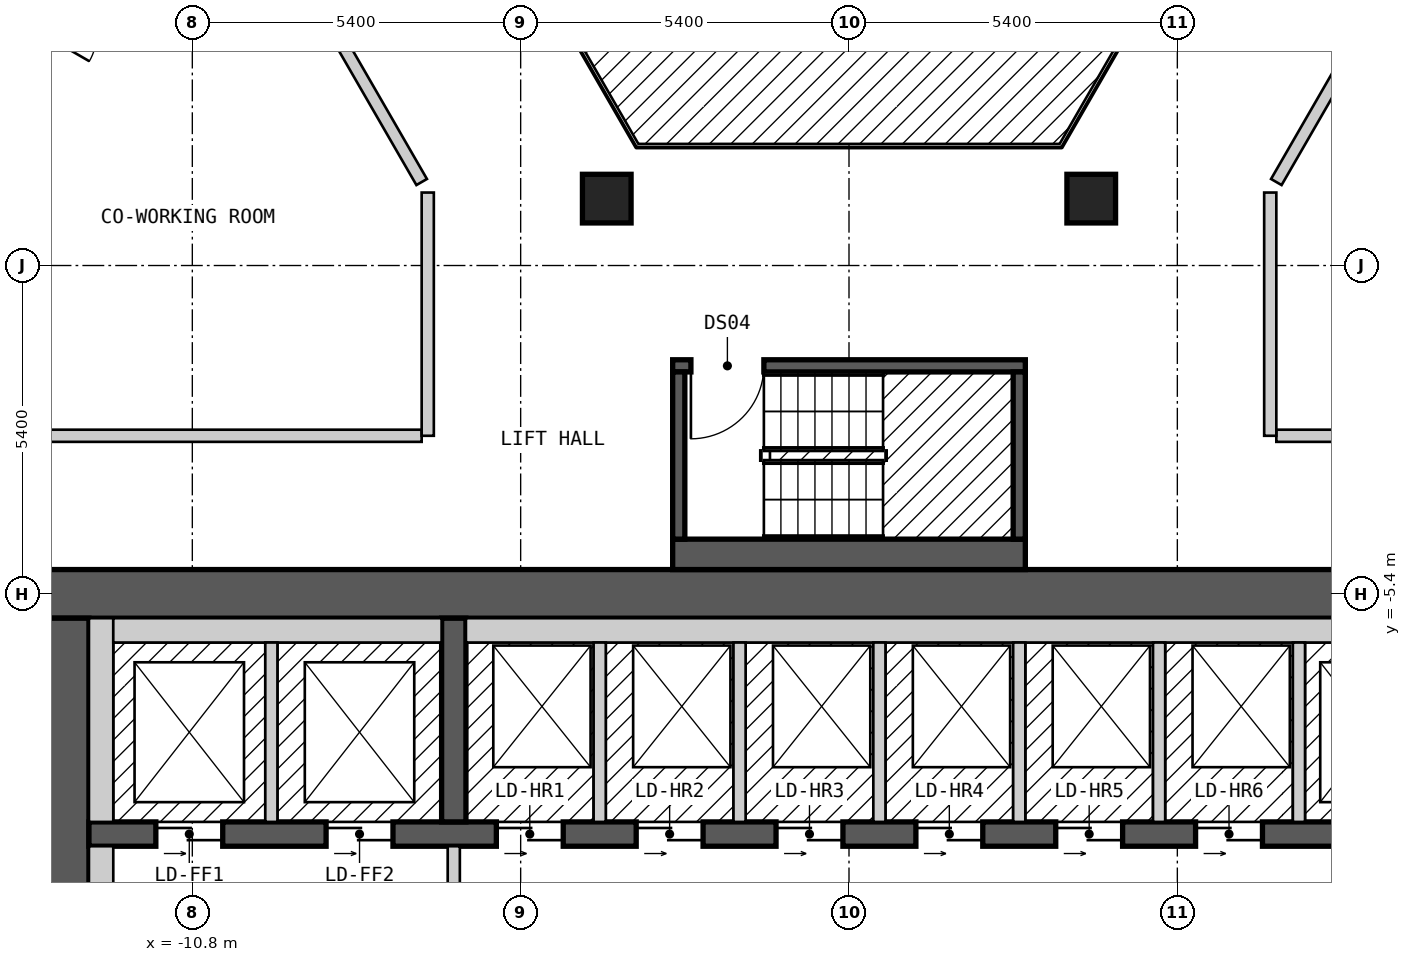
"""IFC4 building model, lengths in metres.
Left out: names, types, materials, properties, quantities, classifications, styles, units other than length and angle.
Written with IfcOpenShell. Run it as: python <this file> out.ifc"""

import sys

from ifc_helpers import new_model, si_unit, direction, frame, frame_2d, origin, origin_2d, place, context, subcontext, project, spatial, rectangle, extrude, element, fill, save


model = new_model("IFC4")
c1 = context("Model", 3, precision=1e-05, world=origin(), true_north=direction((0.0, 1.0)))
c2 = subcontext(c1, "Body", "Model", "MODEL_VIEW")
j1 = project(units=[si_unit("LENGTHUNIT", "METRE"), si_unit("PLANEANGLEUNIT", "RADIAN")], contexts=[c1])
p1 = place(None, origin())
s1 = spatial("IfcSite", under=j1, at=p1, CompositionType="ELEMENT")
p2 = place(p1, origin())
s2 = spatial("IfcBuilding", under=s1, at=p2, CompositionType="ELEMENT")
p3 = place(p2, frame((0.0, 0.0, 126.6)))
s3 = spatial("IfcBuildingStorey", under=s2, at=p3, CompositionType="ELEMENT", Elevation=126.6)
for number, where, z_axis, x_axis in (
    (1, (3.984, 1.1, 0.0), (0.0, 0.0, 1.0), (1.0, 0.0, 0.0)),
    (2, (-3.984, 1.1, 0.0), (0.0, 0.0, 1.0), (1.0, 0.0, 0.0)),
):
    element("IfcColumn", number, at=place(p3, frame(where, z_axis=z_axis, x_axis=x_axis)), inside=s3, PredefinedType="COLUMN", context=c2, shape_type="SweptSolid", body=[
        extrude(rectangle(XDim=0.8, YDim=0.8, at=origin_2d()), origin(), (0.0, 0.0, 1.0), 3.0),
    ])
p4 = place(p3, frame((-13.3, -5.4, 0.0), z_axis=(0.0, 0.0, 1.0), x_axis=(1.0, 0.0, 0.0)))
e3 = element("IfcWall", 3, at=p4, inside=s3, PredefinedType="SHEAR", context=c2, shape_type="SweptSolid", body=[
    extrude(rectangle(XDim=26.6, YDim=0.8, at=frame_2d((13.3, 0.0))), origin(), (0.0, 0.0, 1.0), 2.7),
])
p5 = place(p4, frame((23.65, 0.0, 0.0)))
e4 = element("IfcOpeningElement", 4, at=p5, cuts=e3, PredefinedType="OPENING", context=c2, shape_type="SweptSolid", body=[
    extrude(rectangle(XDim=1.2, YDim=2.1, at=frame_2d((0.6, 1.05))), frame((0.0, 0.41, 0.0), z_axis=(0.0, -1.0, 0.0), x_axis=(1.0, 0.0, 0.0)), (0.0, 0.0, 1.0), 0.82),
])
p6 = place(p3, frame((-12.9, -18.2, 0.0), z_axis=(0.0, 0.0, 1.0), x_axis=(0.0, 1.0, 0.0)))
e5 = element("IfcWall", 5, at=p6, inside=s3, PredefinedType="SHEAR", context=c2, shape_type="SweptSolid", body=[
    extrude(rectangle(XDim=12.4, YDim=0.8, at=frame_2d((6.2, 0.0))), origin(), (0.0, 0.0, 1.0), 2.7),
])
p7 = place(p6, frame((4.0, 0.0, 0.0)))
e6 = element("IfcOpeningElement", 6, at=p7, cuts=e5, PredefinedType="OPENING", context=c2, shape_type="SweptSolid", body=[
    extrude(rectangle(XDim=1.2, YDim=2.1, at=frame_2d((0.6, 1.05))), frame((0.0, 0.41, 0.0), z_axis=(0.0, -1.0, 0.0), x_axis=(1.0, 0.0, 0.0)), (0.0, 0.0, 1.0), 0.82),
])
p8 = place(p3, frame((-12.5, -9.35, 0.0), z_axis=(0.0, 0.0, 1.0), x_axis=(1.0, 0.0, 0.0)))
e7 = element("IfcWall", 7, at=p8, inside=s3, PredefinedType="SHEAR", context=c2, shape_type="SweptSolid", body=[
    extrude(rectangle(XDim=22.7, YDim=0.4, at=frame_2d((11.35, 0.0))), origin(), (0.0, 0.0, 1.0), 2.7),
])
p9 = place(p8, frame((1.1, 0.0, 0.0)))
e8 = element("IfcOpeningElement", 8, at=p9, cuts=e7, PredefinedType="OPENING", context=c2, shape_type="SweptSolid", body=[
    extrude(rectangle(XDim=1.1, YDim=2.1, at=frame_2d((0.55, 1.05))), frame((0.0, 0.21, 0.0), z_axis=(0.0, -1.0, 0.0), x_axis=(1.0, 0.0, 0.0)), (0.0, 0.0, 1.0), 0.42),
])
p10 = place(p8, frame((3.9, 0.0, 0.0)))
e9 = element("IfcOpeningElement", 9, at=p10, cuts=e7, PredefinedType="OPENING", context=c2, shape_type="SweptSolid", body=[
    extrude(rectangle(XDim=1.1, YDim=2.1, at=frame_2d((0.55, 1.05))), frame((0.0, 0.21, 0.0), z_axis=(0.0, -1.0, 0.0), x_axis=(1.0, 0.0, 0.0)), (0.0, 0.0, 1.0), 0.42),
])
p11 = place(p8, frame((6.7, 0.0, 0.0)))
e10 = element("IfcOpeningElement", 10, at=p11, cuts=e7, PredefinedType="OPENING", context=c2, shape_type="SweptSolid", body=[
    extrude(rectangle(XDim=1.1, YDim=2.1, at=frame_2d((0.55, 1.05))), frame((0.0, 0.21, 0.0), z_axis=(0.0, -1.0, 0.0), x_axis=(1.0, 0.0, 0.0)), (0.0, 0.0, 1.0), 0.42),
])
p12 = place(p8, frame((9.0, 0.0, 0.0)))
e11 = element("IfcOpeningElement", 11, at=p12, cuts=e7, PredefinedType="OPENING", context=c2, shape_type="SweptSolid", body=[
    extrude(rectangle(XDim=1.1, YDim=2.1, at=frame_2d((0.55, 1.05))), frame((0.0, 0.21, 0.0), z_axis=(0.0, -1.0, 0.0), x_axis=(1.0, 0.0, 0.0)), (0.0, 0.0, 1.0), 0.42),
])
p13 = place(p8, frame((11.3, 0.0, 0.0)))
e12 = element("IfcOpeningElement", 12, at=p13, cuts=e7, PredefinedType="OPENING", context=c2, shape_type="SweptSolid", body=[
    extrude(rectangle(XDim=1.1, YDim=2.1, at=frame_2d((0.55, 1.05))), frame((0.0, 0.21, 0.0), z_axis=(0.0, -1.0, 0.0), x_axis=(1.0, 0.0, 0.0)), (0.0, 0.0, 1.0), 0.42),
])
p14 = place(p8, frame((13.6, 0.0, 0.0)))
e13 = element("IfcOpeningElement", 13, at=p14, cuts=e7, PredefinedType="OPENING", context=c2, shape_type="SweptSolid", body=[
    extrude(rectangle(XDim=1.1, YDim=2.1, at=frame_2d((0.55, 1.05))), frame((0.0, 0.21, 0.0), z_axis=(0.0, -1.0, 0.0), x_axis=(1.0, 0.0, 0.0)), (0.0, 0.0, 1.0), 0.42),
])
p15 = place(p8, frame((15.9, 0.0, 0.0)))
e14 = element("IfcOpeningElement", 14, at=p15, cuts=e7, PredefinedType="OPENING", context=c2, shape_type="SweptSolid", body=[
    extrude(rectangle(XDim=1.1, YDim=2.1, at=frame_2d((0.55, 1.05))), frame((0.0, 0.21, 0.0), z_axis=(0.0, -1.0, 0.0), x_axis=(1.0, 0.0, 0.0)), (0.0, 0.0, 1.0), 0.42),
])
p16 = place(p8, frame((18.2, 0.0, 0.0)))
e15 = element("IfcOpeningElement", 15, at=p16, cuts=e7, PredefinedType="OPENING", context=c2, shape_type="SweptSolid", body=[
    extrude(rectangle(XDim=1.1, YDim=2.1, at=frame_2d((0.55, 1.05))), frame((0.0, 0.21, 0.0), z_axis=(0.0, -1.0, 0.0), x_axis=(1.0, 0.0, 0.0)), (0.0, 0.0, 1.0), 0.42),
])
p17 = place(p8, frame((20.6, 0.0, 0.0)))
e16 = element("IfcOpeningElement", 16, at=p17, cuts=e7, PredefinedType="OPENING", context=c2, shape_type="SweptSolid", body=[
    extrude(rectangle(XDim=1.1, YDim=2.1, at=frame_2d((0.55, 1.05))), frame((0.0, 0.21, 0.0), z_axis=(0.0, -1.0, 0.0), x_axis=(1.0, 0.0, 0.0)), (0.0, 0.0, 1.0), 0.42),
])
p18 = place(p3, frame((-6.5, -9.15, 0.0), z_axis=(0.0, 0.0, 1.0), x_axis=(0.0, 1.0, 0.0)))
e17 = element("IfcWall", 17, at=p18, inside=s3, PredefinedType="SHEAR", context=c2, shape_type="SweptSolid", body=[
    extrude(rectangle(XDim=3.35, YDim=0.4, at=frame_2d((1.675, 0.0))), origin(), (0.0, 0.0, 1.0), 2.7),
])
p19 = place(p3, frame((-2.9, -4.75, 0.0), z_axis=(0.0, 0.0, 1.0), x_axis=(1.0, 0.0, 0.0)))
e18 = element("IfcWall", 18, at=p19, inside=s3, PredefinedType="SOLIDWALL", context=c2, shape_type="SweptSolid", body=[
    extrude(rectangle(XDim=5.8, YDim=0.5, at=frame_2d((2.9, 0.0))), origin(), (0.0, 0.0, 1.0), 2.7),
])
p20 = place(p3, frame((-2.9, -1.65, 0.0), z_axis=(0.0, 0.0, 1.0), x_axis=(1.0, 0.0, 0.0)))
e19 = element("IfcWall", 19, at=p20, inside=s3, PredefinedType="SOLIDWALL", context=c2, shape_type="SweptSolid", body=[
    extrude(rectangle(XDim=5.8, YDim=0.2, at=frame_2d((2.9, 0.0))), origin(), (0.0, 0.0, 1.0), 2.7),
])
p21 = place(p20, frame((0.3, 0.0, 0.0)))
e20 = element("IfcOpeningElement", 20, at=p21, cuts=e19, PredefinedType="OPENING", context=c2, shape_type="SweptSolid", body=[
    extrude(rectangle(XDim=1.2, YDim=2.1, at=frame_2d((0.6, 1.05))), frame((0.0, 0.11, 0.0), z_axis=(0.0, -1.0, 0.0), x_axis=(1.0, 0.0, 0.0)), (0.0, 0.0, 1.0), 0.22),
])
for number, where, z_axis, x_axis in (
    (21, (-2.8, -4.5, 0.0), (0.0, 0.0, 1.0), (0.0, 1.0, 0.0)),
    (22, (2.8, -4.5, 0.0), (0.0, 0.0, 1.0), (0.0, 1.0, 0.0)),
):
    element("IfcWall", number, at=place(p3, frame(where, z_axis=z_axis, x_axis=x_axis)), inside=s3, PredefinedType="SOLIDWALL", context=c2, shape_type="SweptSolid", body=[
        extrude(rectangle(XDim=2.75, YDim=0.2, at=frame_2d((1.375, 0.0))), origin(), (0.0, 0.0, 1.0), 2.7),
    ])
p22 = place(p3, frame((-10.796, 7.9, 0.0), z_axis=(0.0, 0.0, 1.0), x_axis=(0.499954271211, -0.866051803703, 0.0)))
e23 = element("IfcWall", 23, at=p22, inside=s3, PredefinedType="PARTITIONING", context=c2, shape_type="SweptSolid", body=[
    extrude(rectangle(XDim=7.536, YDim=0.2, at=frame_2d((3.768, 0.0))), origin(), (0.0, 0.0, 1.0), 2.7),
])
p23 = place(p3, frame((7.967, 13.0, 0.0), z_axis=(0.0, 0.0, 1.0), x_axis=(0.50003774998, -0.866003607726, 0.0)))
e24 = element("IfcWall", 24, at=p23, inside=s3, PredefinedType="PARTITIONING", context=c2, shape_type="SweptSolid", body=[
    extrude(rectangle(XDim=14.433, YDim=0.2, at=frame_2d((7.217, 0.0))), origin(), (0.0, 0.0, 1.0), 2.7),
])
p24 = place(p23, frame((6.824, 0.0, 0.0)))
e25 = element("IfcOpeningElement", 25, at=p24, cuts=e24, PredefinedType="OPENING", context=c2, shape_type="SweptSolid", body=[
    extrude(rectangle(XDim=0.9, YDim=2.1, at=frame_2d((0.45, 1.05))), frame((0.0, 0.11, 0.0), z_axis=(0.0, -1.0, 0.0), x_axis=(1.0, 0.0, 0.0)), (0.0, 0.0, 1.0), 0.22),
])
p25 = place(p3, frame((-13.395, -2.8, 0.0), z_axis=(0.0, 0.0, 1.0), x_axis=(1.0, 0.0, 0.0)))
e26 = element("IfcWall", 26, at=p25, inside=s3, PredefinedType="PARTITIONING", context=c2, shape_type="SweptSolid", body=[
    extrude(rectangle(XDim=6.367, YDim=0.2, at=frame_2d((3.184, 0.0))), origin(), (0.0, 0.0, 1.0), 2.7),
])
p26 = place(p3, frame((7.028, -2.8, 0.0), z_axis=(0.0, 0.0, 1.0), x_axis=(1.0, 0.0, 0.0)))
e27 = element("IfcWall", 27, at=p26, inside=s3, PredefinedType="PARTITIONING", context=c2, shape_type="SweptSolid", body=[
    extrude(rectangle(XDim=6.25, YDim=0.2, at=frame_2d((3.125, 0.0))), origin(), (0.0, 0.0, 1.0), 2.7),
])
p27 = place(p3, frame((7.028, 1.373, 0.0), z_axis=(0.0, 0.0, 1.0), x_axis=(0.499954271211, 0.866051803703, 0.0)))
e28 = element("IfcWall", 28, at=p27, inside=s3, PredefinedType="PARTITIONING", context=c2, shape_type="SweptSolid", body=[
    extrude(rectangle(XDim=7.536, YDim=0.2, at=frame_2d((3.768, 0.0))), origin(), (0.0, 0.0, 1.0), 2.7),
])
p28 = place(p3, frame((-15.242, 0.399, 0.0), z_axis=(0.0, 0.0, 1.0), x_axis=(0.499953615651, 0.866052182145, 0.0)))
e29 = element("IfcWall", 29, at=p28, inside=s3, PredefinedType="PARTITIONING", context=c2, shape_type="SweptSolid", body=[
    extrude(rectangle(XDim=8.777, YDim=0.2, at=frame_2d((4.388, 0.0))), origin(), (0.0, 0.0, 1.0), 2.7),
])
p29 = place(p28, frame((3.938, 0.0, 0.0)))
e30 = element("IfcOpeningElement", 30, at=p29, cuts=e29, PredefinedType="OPENING", context=c2, shape_type="SweptSolid", body=[
    extrude(rectangle(XDim=0.9, YDim=2.1, at=frame_2d((0.45, 1.05))), frame((0.0, 0.11, 0.0), z_axis=(0.0, -1.0, 0.0), x_axis=(1.0, 0.0, 0.0)), (0.0, 0.0, 1.0), 0.22),
])
p30 = place(p3, frame((-17.753, 0.45, 0.0), z_axis=(0.0, 0.0, 1.0), x_axis=(0.499990970252, 0.866030617049, 0.0)))
e31 = element("IfcWall", 31, at=p30, inside=s3, PredefinedType="PARTITIONING", context=c2, shape_type="SweptSolid", body=[
    extrude(rectangle(XDim=16.974, YDim=0.2, at=frame_2d((8.487, 0.0))), origin(), (0.0, 0.0, 1.0), 2.7),
])
p31 = place(p30, frame((10.73, 0.0, 0.0)))
e32 = element("IfcOpeningElement", 32, at=p31, cuts=e31, PredefinedType="OPENING", context=c2, shape_type="SweptSolid", body=[
    extrude(rectangle(XDim=1.0, YDim=2.1, at=frame_2d((0.5, 1.05))), frame((0.0, 0.11, 0.0), z_axis=(0.0, -1.0, 0.0), x_axis=(1.0, 0.0, 0.0)), (0.0, 0.0, 1.0), 0.22),
])
p32 = place(p30, frame((5.245, 0.0, 0.0)))
e33 = element("IfcOpeningElement", 33, at=p32, cuts=e31, PredefinedType="OPENING", context=c2, shape_type="SweptSolid", body=[
    extrude(rectangle(XDim=1.0, YDim=2.1, at=frame_2d((0.5, 1.05))), frame((0.0, 0.11, 0.0), z_axis=(0.0, -1.0, 0.0), x_axis=(1.0, 0.0, 0.0)), (0.0, 0.0, 1.0), 0.22),
])
p33 = place(p30, frame((0.594, 0.0, 0.0)))
e34 = element("IfcOpeningElement", 34, at=p33, cuts=e31, PredefinedType="OPENING", context=c2, shape_type="SweptSolid", body=[
    extrude(rectangle(XDim=1.0, YDim=2.1, at=frame_2d((0.5, 1.05))), frame((0.0, 0.11, 0.0), z_axis=(0.0, -1.0, 0.0), x_axis=(1.0, 0.0, 0.0)), (0.0, 0.0, 1.0), 0.22),
])
for number, where, z_axis, x_axis in (
    (35, (6.928, -2.8, 0.0), (0.0, 0.0, 1.0), (0.0, 1.0, 0.0)),
    (36, (-6.928, -2.8, 0.0), (0.0, 0.0, 1.0), (0.0, 1.0, 0.0)),
):
    element("IfcWall", number, at=place(p3, frame(where, z_axis=z_axis, x_axis=x_axis)), inside=s3, PredefinedType="PARTITIONING", context=c2, shape_type="SweptSolid", body=[
        extrude(rectangle(XDim=4.0, YDim=0.2, at=frame_2d((2.0, 0.0))), origin(), (0.0, 0.0, 1.0), 2.7),
    ])
p34 = place(p3, frame((-12.3, -13.0, 0.0), z_axis=(0.0, 0.0, 1.0), x_axis=(0.0, 1.0, 0.0)))
e37 = element("IfcWall", 37, at=p34, inside=s3, PredefinedType="PARTITIONING", context=c2, shape_type="SweptSolid", body=[
    extrude(rectangle(XDim=3.45, YDim=0.4, at=frame_2d((1.725, 0.0))), origin(), (0.0, 0.0, 1.0), 2.7),
])
p35 = place(p3, frame((-12.3, -9.15, 0.0), z_axis=(0.0, 0.0, 1.0), x_axis=(0.0, 1.0, 0.0)))
e38 = element("IfcWall", 38, at=p35, inside=s3, PredefinedType="SOLIDWALL", context=c2, shape_type="SweptSolid", body=[
    extrude(rectangle(XDim=3.35, YDim=0.4, at=frame_2d((1.675, 0.0))), origin(), (0.0, 0.0, 1.0), 2.7),
])
p36 = place(p3, frame((-12.1, -6.0, 0.0), z_axis=(0.0, 0.0, 1.0), x_axis=(1.0, 0.0, 0.0)))
e39 = element("IfcWall", 39, at=p36, inside=s3, PredefinedType="SOLIDWALL", context=c2, shape_type="SweptSolid", body=[
    extrude(rectangle(XDim=5.4, YDim=0.4, at=frame_2d((2.7, 0.0))), origin(), (0.0, 0.0, 1.0), 2.7),
])
p37 = place(p3, frame((-9.5, -9.15, 0.0), z_axis=(0.0, 0.0, 1.0), x_axis=(0.0, 1.0, 0.0)))
e40 = element("IfcWall", 40, at=p37, inside=s3, PredefinedType="SOLIDWALL", context=c2, shape_type="SweptSolid", body=[
    extrude(rectangle(XDim=2.95, YDim=0.2, at=frame_2d((1.475, 0.0))), origin(), (0.0, 0.0, 1.0), 2.7),
])
p38 = place(p3, frame((-6.5, -14.45, 0.0), z_axis=(0.0, 0.0, 1.0), x_axis=(0.0, 1.0, 0.0)))
e41 = element("IfcWall", 41, at=p38, inside=s3, PredefinedType="PARTITIONING", context=c2, shape_type="SweptSolid", body=[
    extrude(rectangle(XDim=4.9, YDim=0.2, at=frame_2d((2.45, 0.0))), origin(), (0.0, 0.0, 1.0), 2.7),
])
p39 = place(p38, frame((3.15, 0.0, 0.0), z_axis=(0.0, 0.0, 1.0), x_axis=(-1.0, 0.0, 0.0)))
e42 = element("IfcOpeningElement", 42, at=p39, cuts=e41, PredefinedType="OPENING", context=c2, shape_type="SweptSolid", body=[
    extrude(rectangle(XDim=1.4, YDim=2.1, at=frame_2d((0.7, 1.05))), frame((0.0, 0.11, 0.0), z_axis=(0.0, -1.0, 0.0), x_axis=(1.0, 0.0, 0.0)), (0.0, 0.0, 1.0), 0.22),
])
p40 = place(p3, frame((-6.3, -6.0, 0.0), z_axis=(0.0, 0.0, 1.0), x_axis=(1.0, 0.0, 0.0)))
e43 = element("IfcWall", 43, at=p40, inside=s3, PredefinedType="SOLIDWALL", context=c2, shape_type="SweptSolid", body=[
    extrude(rectangle(XDim=16.1, YDim=0.4, at=frame_2d((8.05, 0.0))), origin(), (0.0, 0.0, 1.0), 2.7),
])
for number, where, z_axis, x_axis in (
    (44, (-4.1, -9.15, 0.0), (0.0, 0.0, 1.0), (0.0, 1.0, 0.0)),
    (45, (-1.8, -9.15, 0.0), (0.0, 0.0, 1.0), (0.0, 1.0, 0.0)),
    (46, (0.5, -9.15, 0.0), (0.0, 0.0, 1.0), (0.0, 1.0, 0.0)),
    (47, (2.8, -9.15, 0.0), (0.0, 0.0, 1.0), (0.0, 1.0, 0.0)),
    (48, (5.1, -9.15, 0.0), (0.0, 0.0, 1.0), (0.0, 1.0, 0.0)),
    (49, (7.4, -9.15, 0.0), (0.0, 0.0, 1.0), (0.0, 1.0, 0.0)),
):
    element("IfcWall", number, at=place(p3, frame(where, z_axis=z_axis, x_axis=x_axis)), inside=s3, PredefinedType="SOLIDWALL", context=c2, shape_type="SweptSolid", body=[
        extrude(rectangle(XDim=2.95, YDim=0.2, at=frame_2d((1.475, 0.0))), origin(), (0.0, 0.0, 1.0), 2.7),
    ])
p41 = place(p21, origin())
e50 = element("IfcDoor", 50, at=p41, inside=s3, OperationType="SINGLE_SWING_LEFT", PredefinedType="DOOR", context=c2, shape_type="SweptSolid", body=[
    extrude(rectangle(XDim=1.2, YDim=2.1, at=frame_2d((0.6, 1.05))), frame((0.0, 0.025, 0.0), z_axis=(0.0, -1.0, 0.0), x_axis=(1.0, 0.0, 0.0)), (0.0, 0.0, 1.0), 0.05),
])
fill(e20, e50)
p42 = place(p9, origin())
e51 = element("IfcDoor", 51, at=p42, inside=s3, OperationType="DOUBLE_DOOR_SLIDING", PredefinedType="DOOR", context=c2, shape_type="SweptSolid", body=[
    extrude(rectangle(XDim=1.1, YDim=2.1, at=frame_2d((0.55, 1.05))), frame((0.0, 0.025, 0.0), z_axis=(0.0, -1.0, 0.0), x_axis=(1.0, 0.0, 0.0)), (0.0, 0.0, 1.0), 0.05),
])
fill(e8, e51)
p43 = place(p10, origin())
e52 = element("IfcDoor", 52, at=p43, inside=s3, OperationType="DOUBLE_DOOR_SLIDING", PredefinedType="DOOR", context=c2, shape_type="SweptSolid", body=[
    extrude(rectangle(XDim=1.1, YDim=2.1, at=frame_2d((0.55, 1.05))), frame((0.0, 0.025, 0.0), z_axis=(0.0, -1.0, 0.0), x_axis=(1.0, 0.0, 0.0)), (0.0, 0.0, 1.0), 0.05),
])
fill(e9, e52)
p44 = place(p11, origin())
e53 = element("IfcDoor", 53, at=p44, inside=s3, OperationType="DOUBLE_DOOR_SLIDING", PredefinedType="DOOR", context=c2, shape_type="SweptSolid", body=[
    extrude(rectangle(XDim=1.1, YDim=2.1, at=frame_2d((0.55, 1.05))), frame((0.0, 0.025, 0.0), z_axis=(0.0, -1.0, 0.0), x_axis=(1.0, 0.0, 0.0)), (0.0, 0.0, 1.0), 0.05),
])
fill(e10, e53)
p45 = place(p12, origin())
e54 = element("IfcDoor", 54, at=p45, inside=s3, OperationType="DOUBLE_DOOR_SLIDING", PredefinedType="DOOR", context=c2, shape_type="SweptSolid", body=[
    extrude(rectangle(XDim=1.1, YDim=2.1, at=frame_2d((0.55, 1.05))), frame((0.0, 0.025, 0.0), z_axis=(0.0, -1.0, 0.0), x_axis=(1.0, 0.0, 0.0)), (0.0, 0.0, 1.0), 0.05),
])
fill(e11, e54)
p46 = place(p13, origin())
e55 = element("IfcDoor", 55, at=p46, inside=s3, OperationType="DOUBLE_DOOR_SLIDING", PredefinedType="DOOR", context=c2, shape_type="SweptSolid", body=[
    extrude(rectangle(XDim=1.1, YDim=2.1, at=frame_2d((0.55, 1.05))), frame((0.0, 0.025, 0.0), z_axis=(0.0, -1.0, 0.0), x_axis=(1.0, 0.0, 0.0)), (0.0, 0.0, 1.0), 0.05),
])
fill(e12, e55)
p47 = place(p14, origin())
e56 = element("IfcDoor", 56, at=p47, inside=s3, OperationType="DOUBLE_DOOR_SLIDING", PredefinedType="DOOR", context=c2, shape_type="SweptSolid", body=[
    extrude(rectangle(XDim=1.1, YDim=2.1, at=frame_2d((0.55, 1.05))), frame((0.0, 0.025, 0.0), z_axis=(0.0, -1.0, 0.0), x_axis=(1.0, 0.0, 0.0)), (0.0, 0.0, 1.0), 0.05),
])
fill(e13, e56)
p48 = place(p15, origin())
e57 = element("IfcDoor", 57, at=p48, inside=s3, OperationType="DOUBLE_DOOR_SLIDING", PredefinedType="DOOR", context=c2, shape_type="SweptSolid", body=[
    extrude(rectangle(XDim=1.1, YDim=2.1, at=frame_2d((0.55, 1.05))), frame((0.0, 0.025, 0.0), z_axis=(0.0, -1.0, 0.0), x_axis=(1.0, 0.0, 0.0)), (0.0, 0.0, 1.0), 0.05),
])
fill(e14, e57)
p49 = place(p16, origin())
e58 = element("IfcDoor", 58, at=p49, inside=s3, OperationType="DOUBLE_DOOR_SLIDING", PredefinedType="DOOR", context=c2, shape_type="SweptSolid", body=[
    extrude(rectangle(XDim=1.1, YDim=2.1, at=frame_2d((0.55, 1.05))), frame((0.0, 0.025, 0.0), z_axis=(0.0, -1.0, 0.0), x_axis=(1.0, 0.0, 0.0)), (0.0, 0.0, 1.0), 0.05),
])
fill(e15, e58)
save(model, sys.argv[1])
